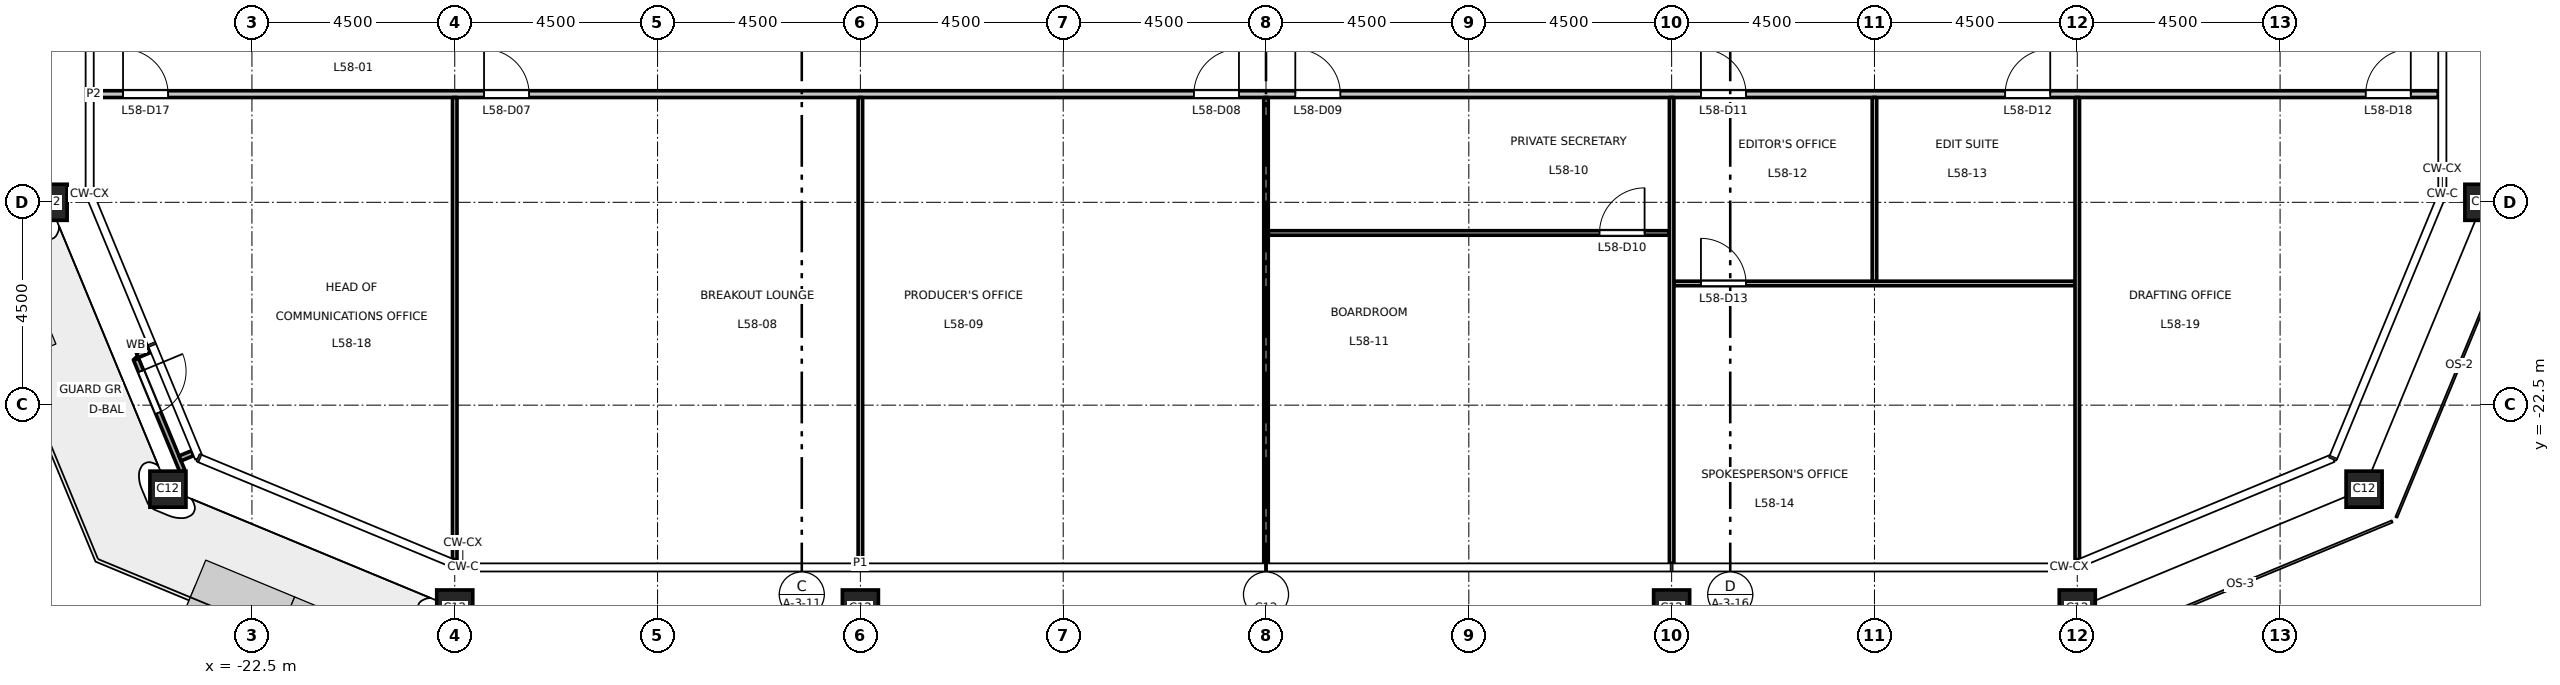
"""IFC4 building model, lengths in metres.
Left out: names, types, materials, properties, quantities, classifications, styles, units other than length and angle.
Written with IfcOpenShell. Run it as: python <this file> out.ifc"""

import sys

from ifc_helpers import new_model, si_unit, direction, frame, frame_2d, origin, origin_2d, place, context, subcontext, project, spatial, rectangle, hollow_rectangle, extrude, element, fill, save


model = new_model("IFC4")
c1 = context("Model", 3, precision=1e-05, world=origin(), true_north=direction((0.0, 1.0)))
c2 = subcontext(c1, "Body", "Model", "MODEL_VIEW")
j1 = project(units=[si_unit("LENGTHUNIT", "METRE"), si_unit("PLANEANGLEUNIT", "RADIAN")], contexts=[c1])
p1 = place(None, origin())
s1 = spatial("IfcSite", under=j1, at=p1, CompositionType="ELEMENT")
p2 = place(p1, origin())
s2 = spatial("IfcBuilding", under=s1, at=p2, CompositionType="ELEMENT")
p3 = place(p2, frame((0.0, 0.0, 269.2)))
s3 = spatial("IfcBuildingStorey", under=s2, at=p3, CompositionType="ELEMENT", Elevation=269.2)
for number, where, z_axis, x_axis in (
    (1, (-18.0, -27.0, 0.0), (0.0, 0.0, 1.0), (1.0, 0.0, 0.0)),
    (2, (-9.0, -27.0, 0.0), (0.0, 0.0, 1.0), (1.0, 0.0, 0.0)),
    (3, (0.0, -27.0, 0.0), (0.0, 0.0, 1.0), (1.0, 0.0, 0.0)),
    (4, (9.0, -27.0, 0.0), (0.0, 0.0, 1.0), (1.0, 0.0, 0.0)),
    (5, (18.0, -27.0, 0.0), (0.0, 0.0, 1.0), (1.0, 0.0, 0.0)),
    (6, (24.364, -24.364, 0.0), (0.0, 0.0, 1.0), (1.0, 0.0, 0.0)),
    (7, (27.0, -18.0, 0.0), (0.0, 0.0, 1.0), (1.0, 0.0, 0.0)),
    (8, (-27.0, -18.0, 0.0), (0.0, 0.0, 1.0), (1.0, 0.0, 0.0)),
    (9, (-24.364, -24.364, 0.0), (0.0, 0.0, 1.0), (1.0, 0.0, 0.0)),
):
    element("IfcColumn", number, at=place(p3, frame(where, z_axis=z_axis, x_axis=x_axis)), inside=s3, PredefinedType="COLUMN", context=c2, shape_type="SweptSolid", body=[
        extrude(hollow_rectangle(XDim=0.8, YDim=0.8, WallThickness=0.045, at=origin_2d()), origin(), (0.0, 0.0, 1.0), 4.5),
    ])
p4 = place(p3, frame((-24.766, -21.276, 0.0), z_axis=(0.0, 0.0, 1.0), x_axis=(-0.923917630863, -0.382591441855, 0.0)))
e10 = element("IfcWall", 10, at=p4, inside=s3, PredefinedType="STANDARD", context=c2, shape_type="SweptSolid", body=[
    extrude(rectangle(XDim=0.3, YDim=0.12, at=frame_2d((0.15, 0.0))), origin(), (0.0, 0.0, 1.0), 4.35),
])
p5 = place(p3, frame((-23.818, -23.566, 0.0), z_axis=(0.0, 0.0, 1.0), x_axis=(-0.923629715641, -0.383285987724, 0.0)))
e11 = element("IfcWall", 11, at=p5, inside=s3, PredefinedType="STANDARD", context=c2, shape_type="SweptSolid", body=[
    extrude(rectangle(XDim=0.3, YDim=0.12, at=frame_2d((0.15, 0.0))), origin(), (0.0, 0.0, 1.0), 4.35),
])
p6 = place(p3, frame((-25.076, -21.469, 0.0), z_axis=(0.0, 0.0, 1.0), x_axis=(0.382695131424, -0.923874686516, 0.0)))
e12 = element("IfcWall", 12, at=p6, inside=s3, PredefinedType="STANDARD", context=c2, shape_type="SweptSolid", body=[
    extrude(rectangle(XDim=2.7, YDim=0.12, at=frame_2d((1.35, 0.0))), origin(), (0.0, 0.0, 1.0), 4.35),
])
p7 = place(p6, frame((0.3, 0.0, 0.0)))
e13 = element("IfcOpeningElement", 13, at=p7, cuts=e12, PredefinedType="OPENING", context=c2, shape_type="SweptSolid", body=[
    extrude(rectangle(XDim=1.0, YDim=2.4, at=frame_2d((0.5, 1.2))), frame((0.0, 0.07, 0.0), z_axis=(0.0, -1.0, 0.0), x_axis=(1.0, 0.0, 0.0)), (0.0, 0.0, 1.0), 0.14),
])
p8 = place(p3, frame((9.05, -19.8, 0.0), z_axis=(0.0, 0.0, 1.0), x_axis=(1.0, 0.0, 0.0)))
e14 = element("IfcWall", 14, at=p8, inside=s3, PredefinedType="PARTITIONING", context=c2, shape_type="SweptSolid", body=[
    extrude(rectangle(XDim=8.9, YDim=0.1, at=frame_2d((4.45, 0.0))), origin(), (0.0, 0.0, 1.0), 4.35),
])
p9 = place(p8, frame((0.6, 0.0, 0.0)))
e15 = element("IfcOpeningElement", 15, at=p9, cuts=e14, PredefinedType="OPENING", context=c2, shape_type="SweptSolid", body=[
    extrude(rectangle(XDim=1.0, YDim=2.1, at=frame_2d((0.5, 1.05))), frame((0.0, 0.06, 0.0), z_axis=(0.0, -1.0, 0.0), x_axis=(1.0, 0.0, 0.0)), (0.0, 0.0, 1.0), 0.12),
])
p10 = place(p3, frame((0.05, -18.68, 0.0), z_axis=(0.0, 0.0, 1.0), x_axis=(1.0, 0.0, 0.0)))
e16 = element("IfcWall", 16, at=p10, inside=s3, PredefinedType="PARTITIONING", context=c2, shape_type="SweptSolid", body=[
    extrude(rectangle(XDim=8.9, YDim=0.1, at=frame_2d((4.45, 0.0))), origin(), (0.0, 0.0, 1.0), 4.35),
])
p11 = place(p10, frame((7.35, 0.0, 0.0)))
e17 = element("IfcOpeningElement", 17, at=p11, cuts=e16, PredefinedType="OPENING", context=c2, shape_type="SweptSolid", body=[
    extrude(rectangle(XDim=1.0, YDim=2.1, at=frame_2d((0.5, 1.05))), frame((0.0, 0.06, 0.0), z_axis=(0.0, -1.0, 0.0), x_axis=(1.0, 0.0, 0.0)), (0.0, 0.0, 1.0), 0.12),
])
p12 = place(p3, frame((-26.01, -15.6, 0.0), z_axis=(0.0, 0.0, 1.0), x_axis=(1.0, 0.0, 0.0)))
e18 = element("IfcWall", 18, at=p12, inside=s3, PredefinedType="PARTITIONING", context=c2, shape_type="SweptSolid", body=[
    extrude(rectangle(XDim=52.02, YDim=0.15, at=frame_2d((26.01, 0.0))), origin(), (0.0, 0.0, 1.0), 4.35),
])
p13 = place(p12, frame((8.66, 0.0, 0.0)))
e19 = element("IfcOpeningElement", 19, at=p13, cuts=e18, PredefinedType="OPENING", context=c2, shape_type="SweptSolid", body=[
    extrude(rectangle(XDim=1.0, YDim=2.1, at=frame_2d((0.5, 1.05))), frame((0.0, 0.085, 0.0), z_axis=(0.0, -1.0, 0.0), x_axis=(1.0, 0.0, 0.0)), (0.0, 0.0, 1.0), 0.17),
])
p14 = place(p12, frame((24.41, 0.0, 0.0)))
e20 = element("IfcOpeningElement", 20, at=p14, cuts=e18, PredefinedType="OPENING", context=c2, shape_type="SweptSolid", body=[
    extrude(rectangle(XDim=1.0, YDim=2.1, at=frame_2d((0.5, 1.05))), frame((0.0, 0.085, 0.0), z_axis=(0.0, -1.0, 0.0), x_axis=(1.0, 0.0, 0.0)), (0.0, 0.0, 1.0), 0.17),
])
p15 = place(p12, frame((26.66, 0.0, 0.0)))
e21 = element("IfcOpeningElement", 21, at=p15, cuts=e18, PredefinedType="OPENING", context=c2, shape_type="SweptSolid", body=[
    extrude(rectangle(XDim=1.0, YDim=2.1, at=frame_2d((0.5, 1.05))), frame((0.0, 0.085, 0.0), z_axis=(0.0, -1.0, 0.0), x_axis=(1.0, 0.0, 0.0)), (0.0, 0.0, 1.0), 0.17),
])
p16 = place(p12, frame((35.66, 0.0, 0.0)))
e22 = element("IfcOpeningElement", 22, at=p16, cuts=e18, PredefinedType="OPENING", context=c2, shape_type="SweptSolid", body=[
    extrude(rectangle(XDim=1.0, YDim=2.1, at=frame_2d((0.5, 1.05))), frame((0.0, 0.085, 0.0), z_axis=(0.0, -1.0, 0.0), x_axis=(1.0, 0.0, 0.0)), (0.0, 0.0, 1.0), 0.17),
])
p17 = place(p12, frame((42.41, 0.0, 0.0)))
e23 = element("IfcOpeningElement", 23, at=p17, cuts=e18, PredefinedType="OPENING", context=c2, shape_type="SweptSolid", body=[
    extrude(rectangle(XDim=1.0, YDim=2.1, at=frame_2d((0.5, 1.05))), frame((0.0, 0.085, 0.0), z_axis=(0.0, -1.0, 0.0), x_axis=(1.0, 0.0, 0.0)), (0.0, 0.0, 1.0), 0.17),
])
p18 = place(p12, frame((0.65, 0.0, 0.0)))
e24 = element("IfcOpeningElement", 24, at=p18, cuts=e18, PredefinedType="OPENING", context=c2, shape_type="SweptSolid", body=[
    extrude(rectangle(XDim=1.0, YDim=2.1, at=frame_2d((0.5, 1.05))), frame((0.0, 0.085, 0.0), z_axis=(0.0, -1.0, 0.0), x_axis=(1.0, 0.0, 0.0)), (0.0, 0.0, 1.0), 0.17),
])
p19 = place(p12, frame((50.41, 0.0, 0.0)))
e25 = element("IfcOpeningElement", 25, at=p19, cuts=e18, PredefinedType="OPENING", context=c2, shape_type="SweptSolid", body=[
    extrude(rectangle(XDim=1.0, YDim=2.1, at=frame_2d((0.5, 1.05))), frame((0.0, 0.085, 0.0), z_axis=(0.0, -1.0, 0.0), x_axis=(1.0, 0.0, 0.0)), (0.0, 0.0, 1.0), 0.17),
])
p20 = place(p3, frame((-18.0, -25.928, 0.0), z_axis=(0.0, 0.0, 1.0), x_axis=(0.0, 1.0, 0.0)))
e26 = element("IfcWall", 26, at=p20, inside=s3, PredefinedType="PARTITIONING", context=c2, shape_type="SweptSolid", body=[
    extrude(rectangle(XDim=10.253, YDim=0.1, at=frame_2d((5.126, 0.0))), origin(), (0.0, 0.0, 1.0), 3.65),
])
p21 = place(p3, frame((-9.0, -26.01, 0.0), z_axis=(0.0, 0.0, 1.0), x_axis=(0.0, 1.0, 0.0)))
e27 = element("IfcWall", 27, at=p21, inside=s3, PredefinedType="PARTITIONING", context=c2, shape_type="SweptSolid", body=[
    extrude(rectangle(XDim=10.335, YDim=0.1, at=frame_2d((5.167, 0.0))), origin(), (0.0, 0.0, 1.0), 3.65),
])
p22 = place(p3, frame((0.0, -26.01, 0.0), z_axis=(0.0, 0.0, 1.0), x_axis=(0.0, 1.0, 0.0)))
e28 = element("IfcWall", 28, at=p22, inside=s3, PredefinedType="PARTITIONING", context=c2, shape_type="SweptSolid", body=[
    extrude(rectangle(XDim=10.335, YDim=0.1, at=frame_2d((5.167, 0.0))), origin(), (0.0, 0.0, 1.0), 3.55),
])
p23 = place(p3, frame((9.0, -26.01, 0.0), z_axis=(0.0, 0.0, 1.0), x_axis=(0.0, 1.0, 0.0)))
e29 = element("IfcWall", 29, at=p23, inside=s3, PredefinedType="PARTITIONING", context=c2, shape_type="SweptSolid", body=[
    extrude(rectangle(XDim=10.335, YDim=0.1, at=frame_2d((5.167, 0.0))), origin(), (0.0, 0.0, 1.0), 3.65),
])
p24 = place(p3, frame((13.5, -19.75, 0.0), z_axis=(0.0, 0.0, 1.0), x_axis=(0.0, 1.0, 0.0)))
e30 = element("IfcWall", 30, at=p24, inside=s3, PredefinedType="PARTITIONING", context=c2, shape_type="SweptSolid", body=[
    extrude(rectangle(XDim=4.075, YDim=0.1, at=frame_2d((2.038, 0.0))), origin(), (0.0, 0.0, 1.0), 4.35),
])
p25 = place(p3, frame((18.0, -25.928, 0.0), z_axis=(0.0, 0.0, 1.0), x_axis=(0.0, 1.0, 0.0)))
e31 = element("IfcWall", 31, at=p25, inside=s3, PredefinedType="PARTITIONING", context=c2, shape_type="SweptSolid", body=[
    extrude(rectangle(XDim=10.253, YDim=0.1, at=frame_2d((5.126, 0.0))), origin(), (0.0, 0.0, 1.0), 3.65),
])
p26 = place(p7, origin())
e32 = element("IfcDoor", 32, at=p26, inside=s3, OperationType="SINGLE_SWING_LEFT", PredefinedType="DOOR", context=c2, shape_type="SweptSolid", body=[
    extrude(rectangle(XDim=1.0, YDim=2.4, at=frame_2d((0.5, 1.2))), frame((0.0, 0.025, 0.0), z_axis=(0.0, -1.0, 0.0), x_axis=(1.0, 0.0, 0.0)), (0.0, 0.0, 1.0), 0.05),
])
fill(e13, e32)
p27 = place(p13, origin())
e33 = element("IfcDoor", 33, at=p27, inside=s3, OperationType="SINGLE_SWING_LEFT", PredefinedType="DOOR", context=c2, shape_type="SweptSolid", body=[
    extrude(rectangle(XDim=1.0, YDim=2.1, at=frame_2d((0.5, 1.05))), frame((0.0, 0.025, 0.0), z_axis=(0.0, -1.0, 0.0), x_axis=(1.0, 0.0, 0.0)), (0.0, 0.0, 1.0), 0.05),
])
fill(e19, e33)
p28 = place(p14, origin())
e34 = element("IfcDoor", 34, at=p28, inside=s3, OperationType="SINGLE_SWING_RIGHT", PredefinedType="DOOR", context=c2, shape_type="SweptSolid", body=[
    extrude(rectangle(XDim=1.0, YDim=2.1, at=frame_2d((0.5, 1.05))), frame((0.0, 0.025, 0.0), z_axis=(0.0, -1.0, 0.0), x_axis=(1.0, 0.0, 0.0)), (0.0, 0.0, 1.0), 0.05),
])
fill(e20, e34)
p29 = place(p15, origin())
e35 = element("IfcDoor", 35, at=p29, inside=s3, OperationType="SINGLE_SWING_LEFT", PredefinedType="DOOR", context=c2, shape_type="SweptSolid", body=[
    extrude(rectangle(XDim=1.0, YDim=2.1, at=frame_2d((0.5, 1.05))), frame((0.0, 0.025, 0.0), z_axis=(0.0, -1.0, 0.0), x_axis=(1.0, 0.0, 0.0)), (0.0, 0.0, 1.0), 0.05),
])
fill(e21, e35)
p30 = place(p11, origin())
e36 = element("IfcDoor", 36, at=p30, inside=s3, OperationType="SINGLE_SWING_RIGHT", PredefinedType="DOOR", context=c2, shape_type="SweptSolid", body=[
    extrude(rectangle(XDim=1.0, YDim=2.1, at=frame_2d((0.5, 1.05))), frame((0.0, 0.025, 0.0), z_axis=(0.0, -1.0, 0.0), x_axis=(1.0, 0.0, 0.0)), (0.0, 0.0, 1.0), 0.05),
])
fill(e17, e36)
p31 = place(p16, origin())
e37 = element("IfcDoor", 37, at=p31, inside=s3, OperationType="SINGLE_SWING_LEFT", PredefinedType="DOOR", context=c2, shape_type="SweptSolid", body=[
    extrude(rectangle(XDim=1.0, YDim=2.1, at=frame_2d((0.5, 1.05))), frame((0.0, 0.025, 0.0), z_axis=(0.0, -1.0, 0.0), x_axis=(1.0, 0.0, 0.0)), (0.0, 0.0, 1.0), 0.05),
])
fill(e22, e37)
p32 = place(p17, origin())
e38 = element("IfcDoor", 38, at=p32, inside=s3, OperationType="SINGLE_SWING_RIGHT", PredefinedType="DOOR", context=c2, shape_type="SweptSolid", body=[
    extrude(rectangle(XDim=1.0, YDim=2.1, at=frame_2d((0.5, 1.05))), frame((0.0, 0.025, 0.0), z_axis=(0.0, -1.0, 0.0), x_axis=(1.0, 0.0, 0.0)), (0.0, 0.0, 1.0), 0.05),
])
fill(e23, e38)
p33 = place(p9, origin())
e39 = element("IfcDoor", 39, at=p33, inside=s3, OperationType="SINGLE_SWING_LEFT", PredefinedType="DOOR", context=c2, shape_type="SweptSolid", body=[
    extrude(rectangle(XDim=1.0, YDim=2.1, at=frame_2d((0.5, 1.05))), frame((0.0, 0.025, 0.0), z_axis=(0.0, -1.0, 0.0), x_axis=(1.0, 0.0, 0.0)), (0.0, 0.0, 1.0), 0.05),
])
fill(e15, e39)
p34 = place(p18, origin())
e40 = element("IfcDoor", 40, at=p34, inside=s3, OperationType="SINGLE_SWING_LEFT", PredefinedType="DOOR", context=c2, shape_type="SweptSolid", body=[
    extrude(rectangle(XDim=1.0, YDim=2.1, at=frame_2d((0.5, 1.05))), frame((0.0, 0.025, 0.0), z_axis=(0.0, -1.0, 0.0), x_axis=(1.0, 0.0, 0.0)), (0.0, 0.0, 1.0), 0.05),
])
fill(e24, e40)
p35 = place(p19, origin())
e41 = element("IfcDoor", 41, at=p35, inside=s3, OperationType="SINGLE_SWING_RIGHT", PredefinedType="DOOR", context=c2, shape_type="SweptSolid", body=[
    extrude(rectangle(XDim=1.0, YDim=2.1, at=frame_2d((0.5, 1.05))), frame((0.0, 0.025, 0.0), z_axis=(0.0, -1.0, 0.0), x_axis=(1.0, 0.0, 0.0)), (0.0, 0.0, 1.0), 0.05),
])
fill(e25, e41)
save(model, sys.argv[1])
